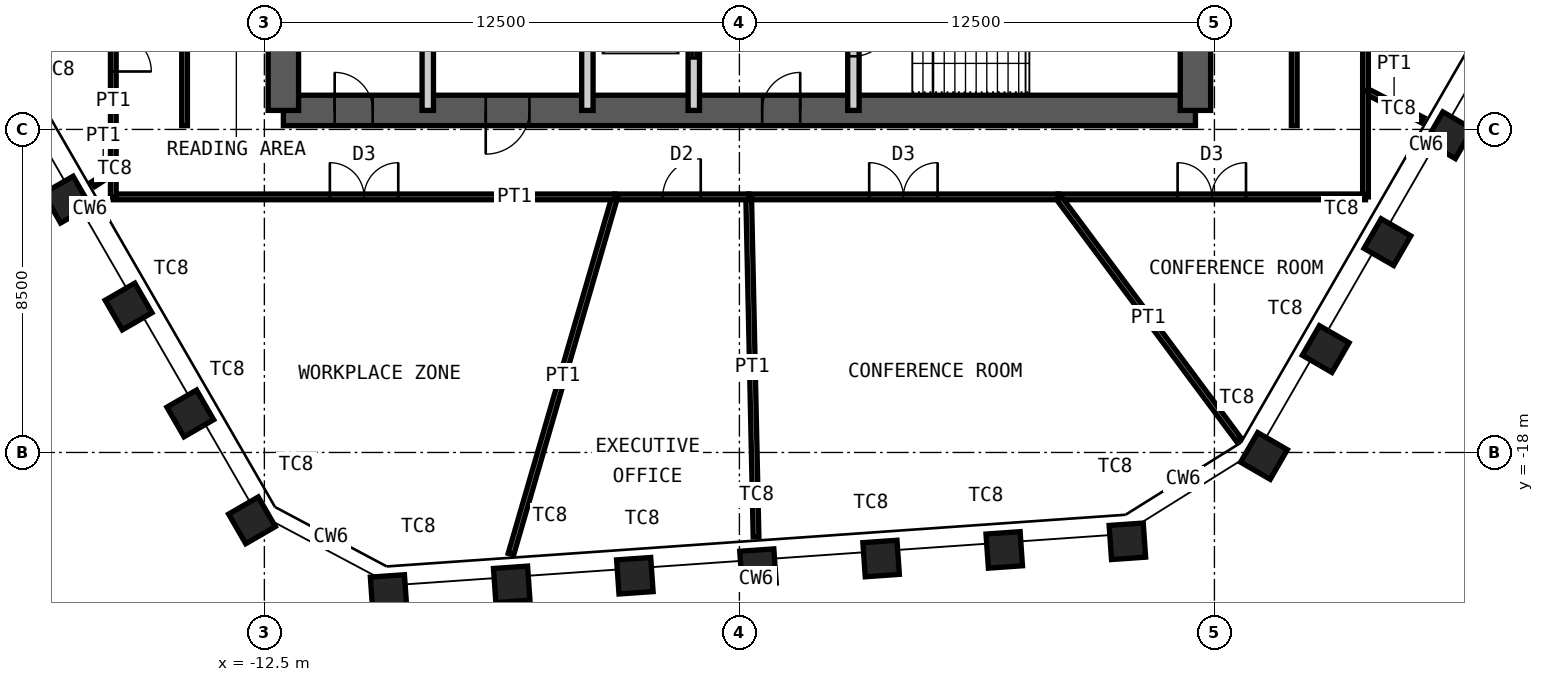
"""IFC4 building model, lengths in metres.
Left out: names, types, materials, properties, quantities, classifications, styles, units other than length and angle.
Written with IfcOpenShell. Run it as: python <this file> out.ifc"""

import sys

from ifc_helpers import new_model, si_unit, direction, frame, frame_2d, origin, origin_2d, place, context, subcontext, project, spatial, rectangle, hollow_rectangle, extrude, element, fill, save


model = new_model("IFC4")
c1 = context("Model", 3, precision=1e-05, world=origin(), true_north=direction((0.0, 1.0)))
c2 = subcontext(c1, "Body", "Model", "MODEL_VIEW")
j1 = project(units=[si_unit("LENGTHUNIT", "METRE"), si_unit("PLANEANGLEUNIT", "RADIAN")], contexts=[c1])
p1 = place(None, origin())
s1 = spatial("IfcSite", under=j1, at=p1, CompositionType="ELEMENT")
p2 = place(p1, origin())
s2 = spatial("IfcBuilding", under=s1, at=p2, CompositionType="ELEMENT")
p3 = place(p2, frame((0.0, 0.0, 325.0)))
s3 = spatial("IfcBuildingStorey", under=s2, at=p3, CompositionType="ELEMENT", Elevation=325.0)
for number, where, z_axis, x_axis in (
    (1, (18.676, -9.653, 0.0), (0.0, 0.0, 1.0), (0.5, 0.866, 0.0)),
    (2, (17.052, -12.466, 0.0), (0.0, 0.0, 1.0), (0.5, 0.866, 0.0)),
    (3, (15.427, -15.279, 0.0), (0.0, 0.0, 1.0), (0.5, 0.866, 0.0)),
    (4, (13.803, -18.092, 0.0), (0.0, 0.0, 1.0), (0.5, 0.866, 0.0)),
    (5, (10.209, -20.337, 0.0), (0.0, 0.0, 1.0), (0.998, 0.07, 0.0)),
    (6, (6.969, -20.564, 0.0), (0.0, 0.0, 1.0), (0.998, 0.07, 0.0)),
    (7, (3.729, -20.791, 0.0), (0.0, 0.0, 1.0), (0.998, 0.07, 0.0)),
    (8, (0.489, -21.017, 0.0), (0.0, 0.0, 1.0), (0.998, 0.07, 0.0)),
    (9, (-2.751, -21.244, 0.0), (0.0, 0.0, 1.0), (0.998, 0.07, 0.0)),
    (10, (-5.991, -21.47, 0.0), (0.0, 0.0, 1.0), (0.998, 0.07, 0.0)),
    (11, (-9.231, -21.697, 0.0), (0.0, 0.0, 1.0), (0.998, 0.07, 0.0)),
    (12, (-12.825, -19.786, 0.0), (0.0, 0.0, 1.0), (0.5, -0.866, 0.0)),
    (13, (-14.449, -16.973, 0.0), (0.0, 0.0, 1.0), (0.5, -0.866, 0.0)),
    (14, (-16.073, -14.16, 0.0), (0.0, 0.0, 1.0), (0.5, -0.866, 0.0)),
    (15, (-17.698, -11.347, 0.0), (0.0, 0.0, 1.0), (0.5, -0.866, 0.0)),
):
    element("IfcColumn", number, at=place(p3, frame(where, z_axis=z_axis, x_axis=x_axis)), inside=s3, PredefinedType="COLUMN", context=c2, shape_type="SweptSolid", body=[
        extrude(hollow_rectangle(XDim=0.9, YDim=0.9, WallThickness=0.05, at=origin_2d()), origin(), (0.0, 0.0, 1.0), 4.2),
    ])
p4 = place(p3, frame((-12.0, -9.0, 0.0), z_axis=(0.0, 0.0, 1.0), x_axis=(1.0, 0.0, 0.0)))
e16 = element("IfcWall", 16, at=p4, inside=s3, PredefinedType="SHEAR", context=c2, shape_type="SweptSolid", body=[
    extrude(rectangle(XDim=24.0, YDim=0.8, at=frame_2d((12.0, 0.0))), origin(), (0.0, 0.0, 1.0), 4.2),
])
p5 = place(p4, frame((1.35, 0.0, 0.0)))
e17 = element("IfcOpeningElement", 17, at=p5, cuts=e16, PredefinedType="OPENING", context=c2, shape_type="SweptSolid", body=[
    extrude(rectangle(XDim=1.0, YDim=2.1, at=frame_2d((0.5, 1.05))), frame((0.0, 0.41, 0.0), z_axis=(0.0, -1.0, 0.0), x_axis=(1.0, 0.0, 0.0)), (0.0, 0.0, 1.0), 0.82),
])
p6 = place(p4, frame((5.325, 0.0, 0.0)))
e18 = element("IfcOpeningElement", 18, at=p6, cuts=e16, PredefinedType="OPENING", context=c2, shape_type="SweptSolid", body=[
    extrude(rectangle(XDim=1.15, YDim=2.1, at=frame_2d((0.575, 1.05))), frame((0.0, 0.41, 0.0), z_axis=(0.0, -1.0, 0.0), x_axis=(1.0, 0.0, 0.0)), (0.0, 0.0, 1.0), 0.82),
])
p7 = place(p4, frame((12.6, 0.0, 0.0)))
e19 = element("IfcOpeningElement", 19, at=p7, cuts=e16, PredefinedType="OPENING", context=c2, shape_type="SweptSolid", body=[
    extrude(rectangle(XDim=1.0, YDim=2.1, at=frame_2d((0.5, 1.05))), frame((0.0, 0.41, 0.0), z_axis=(0.0, -1.0, 0.0), x_axis=(1.0, 0.0, 0.0)), (0.0, 0.0, 1.0), 0.82),
])
p8 = place(p3, frame((12.0, -9.0, 0.0), z_axis=(0.0, 0.0, 1.0), x_axis=(0.0, 1.0, 0.0)))
e20 = element("IfcWall", 20, at=p8, inside=s3, PredefinedType="SHEAR", context=c2, shape_type="SweptSolid", body=[
    extrude(rectangle(XDim=18.0, YDim=0.8, at=frame_2d((9.0, 0.0))), origin(), (0.0, 0.0, 1.0), 4.2),
])
p9 = place(p8, frame((8.1, 0.0, 0.0)))
e21 = element("IfcOpeningElement", 21, at=p9, cuts=e20, PredefinedType="OPENING", context=c2, shape_type="SweptSolid", body=[
    extrude(rectangle(XDim=1.8, YDim=2.1, at=frame_2d((0.9, 1.05))), frame((0.0, 0.41, 0.0), z_axis=(0.0, -1.0, 0.0), x_axis=(1.0, 0.0, 0.0)), (0.0, 0.0, 1.0), 0.82),
])
p10 = place(p3, frame((-12.0, -9.0, 0.0), z_axis=(0.0, 0.0, 1.0), x_axis=(0.0, 1.0, 0.0)))
e22 = element("IfcWall", 22, at=p10, inside=s3, PredefinedType="SHEAR", context=c2, shape_type="SweptSolid", body=[
    extrude(rectangle(XDim=18.0, YDim=0.8, at=frame_2d((9.0, 0.0))), origin(), (0.0, 0.0, 1.0), 4.2),
])
p11 = place(p10, frame((8.1, 0.0, 0.0)))
e23 = element("IfcOpeningElement", 23, at=p11, cuts=e22, PredefinedType="OPENING", context=c2, shape_type="SweptSolid", body=[
    extrude(rectangle(XDim=1.8, YDim=2.1, at=frame_2d((0.9, 1.05))), frame((0.0, 0.41, 0.0), z_axis=(0.0, -1.0, 0.0), x_axis=(1.0, 0.0, 0.0)), (0.0, 0.0, 1.0), 0.82),
])
for number, where, z_axis, x_axis in (
    (24, (-8.2, -9.0, 0.0), (0.0, 0.0, 1.0), (0.0, 1.0, 0.0)),
    (25, (-4.0, -9.0, 0.0), (0.0, 0.0, 1.0), (0.0, 1.0, 0.0)),
):
    element("IfcWall", number, at=place(p3, frame(where, z_axis=z_axis, x_axis=x_axis)), inside=s3, PredefinedType="PARTITIONING", context=c2, shape_type="SweptSolid", body=[
        extrude(rectangle(XDim=3.85, YDim=0.3, at=frame_2d((1.925, 0.0))), origin(), (0.0, 0.0, 1.0), 3.98),
    ])
p12 = place(p3, frame((-1.2, -9.0, 0.0), z_axis=(0.0, 0.0, 1.0), x_axis=(0.0, 1.0, 0.0)))
e26 = element("IfcWall", 26, at=p12, inside=s3, PredefinedType="PARTITIONING", context=c2, shape_type="SweptSolid", body=[
    extrude(rectangle(XDim=3.85, YDim=0.3, at=frame_2d((1.925, 0.0))), origin(), (0.0, 0.0, 1.0), 3.98),
])
p13 = place(p12, frame((1.375, 0.0, 0.0)))
e27 = element("IfcOpeningElement", 27, at=p13, cuts=e26, PredefinedType="OPENING", context=c2, shape_type="SweptSolid", body=[
    extrude(rectangle(XDim=1.1, YDim=2.4, at=frame_2d((0.55, 1.2))), frame((0.0, 0.16, 0.0), z_axis=(0.0, -1.0, 0.0), x_axis=(1.0, 0.0, 0.0)), (0.0, 0.0, 1.0), 0.32),
])
p14 = place(p3, frame((3.0, -9.0, 0.0), z_axis=(0.0, 0.0, 1.0), x_axis=(0.0, 1.0, 0.0)))
e28 = element("IfcWall", 28, at=p14, inside=s3, PredefinedType="PARTITIONING", context=c2, shape_type="SweptSolid", body=[
    extrude(rectangle(XDim=3.85, YDim=0.3, at=frame_2d((1.925, 0.0))), origin(), (0.0, 0.0, 1.0), 3.98),
])
p15 = place(p14, frame((1.425, 0.0, 0.0)))
e29 = element("IfcOpeningElement", 29, at=p15, cuts=e28, PredefinedType="OPENING", context=c2, shape_type="SweptSolid", body=[
    extrude(rectangle(XDim=1.0, YDim=2.1, at=frame_2d((0.5, 1.05))), frame((0.0, 0.16, 0.0), z_axis=(0.0, -1.0, 0.0), x_axis=(1.0, 0.0, 0.0)), (0.0, 0.0, 1.0), 0.32),
])
p16 = place(p3, frame((17.98, -9.257, 0.0), z_axis=(0.0, 0.0, 1.0), x_axis=(-0.889058145064, 0.457794292991, 0.0)))
e30 = element("IfcWall", 30, at=p16, inside=s3, PredefinedType="PARTITIONING", context=c2, shape_type="SweptSolid", body=[
    extrude(rectangle(XDim=1.693, YDim=0.15, at=frame_2d((0.847, 0.0))), origin(), (0.0, 0.0, 1.0), 3.33),
])
p17 = place(p3, frame((16.475, -8.482, 0.0), z_axis=(0.0, 0.0, 1.0), x_axis=(0.0, -1.0, 0.0)))
e31 = element("IfcWall", 31, at=p17, inside=s3, PredefinedType="PARTITIONING", context=c2, shape_type="SweptSolid", body=[
    extrude(rectangle(XDim=2.793, YDim=0.15, at=frame_2d((1.396, 0.0))), origin(), (0.0, 0.0, 1.0), 4.03),
])
p18 = place(p3, frame((16.475, -11.275, 0.0), z_axis=(0.0, 0.0, 1.0), x_axis=(-1.0, 0.0, 0.0)))
e32 = element("IfcWall", 32, at=p18, inside=s3, PredefinedType="PARTITIONING", context=c2, shape_type="SweptSolid", body=[
    extrude(rectangle(XDim=8.088, YDim=0.15, at=frame_2d((4.044, 0.0))), origin(), (0.0, 0.0, 1.0), 4.03),
])
p19 = place(p18, frame((3.144, 0.0, 0.0)))
e33 = element("IfcOpeningElement", 33, at=p19, cuts=e32, PredefinedType="OPENING", context=c2, shape_type="SweptSolid", body=[
    extrude(rectangle(XDim=1.8, YDim=2.4, at=frame_2d((0.9, 1.2))), frame((0.0, 0.085, 0.0), z_axis=(0.0, -1.0, 0.0), x_axis=(1.0, 0.0, 0.0)), (0.0, 0.0, 1.0), 0.17),
])
p20 = place(p3, frame((13.138, -17.661, 0.0), z_axis=(0.0, 0.0, 1.0), x_axis=(-0.596829877953, 0.802367806422, 0.0)))
e34 = element("IfcWall", 34, at=p20, inside=s3, PredefinedType="PARTITIONING", context=c2, shape_type="SweptSolid", body=[
    extrude(rectangle(XDim=7.959, YDim=0.15, at=frame_2d((3.98, 0.0))), origin(), (0.0, 0.0, 1.0), 2.93),
])
p21 = place(p3, frame((8.387, -11.275, 0.0), z_axis=(0.0, 0.0, 1.0), x_axis=(-1.0, 0.0, 0.0)))
e35 = element("IfcWall", 35, at=p21, inside=s3, PredefinedType="PARTITIONING", context=c2, shape_type="SweptSolid", body=[
    extrude(rectangle(XDim=8.143, YDim=0.15, at=frame_2d((4.071, 0.0))), origin(), (0.0, 0.0, 1.0), 4.03),
])
p22 = place(p21, frame((3.171, 0.0, 0.0)))
e36 = element("IfcOpeningElement", 36, at=p22, cuts=e35, PredefinedType="OPENING", context=c2, shape_type="SweptSolid", body=[
    extrude(rectangle(XDim=1.8, YDim=2.4, at=frame_2d((0.9, 1.2))), frame((0.0, 0.085, 0.0), z_axis=(0.0, -1.0, 0.0), x_axis=(1.0, 0.0, 0.0)), (0.0, 0.0, 1.0), 0.17),
])
p23 = place(p3, frame((0.438, -20.219, 0.0), z_axis=(0.0, 0.0, 1.0), x_axis=(-0.021641488123, 0.99976579557, 0.0)))
e37 = element("IfcWall", 37, at=p23, inside=s3, PredefinedType="PARTITIONING", context=c2, shape_type="SweptSolid", body=[
    extrude(rectangle(XDim=8.946, YDim=0.15, at=frame_2d((4.473, 0.0))), origin(), (0.0, 0.0, 1.0), 3.33),
])
p24 = place(p3, frame((0.244, -11.275, 0.0), z_axis=(0.0, 0.0, 1.0), x_axis=(-1.0, 0.0, 0.0)))
e38 = element("IfcWall", 38, at=p24, inside=s3, PredefinedType="PARTITIONING", context=c2, shape_type="SweptSolid", body=[
    extrude(rectangle(XDim=3.523, YDim=0.15, at=frame_2d((1.761, 0.0))), origin(), (0.0, 0.0, 1.0), 4.03),
])
p25 = place(p24, frame((1.261, 0.0, 0.0)))
e39 = element("IfcOpeningElement", 39, at=p25, cuts=e38, PredefinedType="OPENING", context=c2, shape_type="SweptSolid", body=[
    extrude(rectangle(XDim=1.0, YDim=2.4, at=frame_2d((0.5, 1.2))), frame((0.0, 0.085, 0.0), z_axis=(0.0, -1.0, 0.0), x_axis=(1.0, 0.0, 0.0)), (0.0, 0.0, 1.0), 0.17),
])
p26 = place(p3, frame((-6.012, -20.676, 0.0), z_axis=(0.0, 0.0, 1.0), x_axis=(0.279197441451, 0.960233715658, 0.0)))
e40 = element("IfcWall", 40, at=p26, inside=s3, PredefinedType="PARTITIONING", context=c2, shape_type="SweptSolid", body=[
    extrude(rectangle(XDim=9.79, YDim=0.15, at=frame_2d((4.895, 0.0))), origin(), (0.0, 0.0, 1.0), 3.33),
])
p27 = place(p3, frame((-3.279, -11.275, 0.0), z_axis=(0.0, 0.0, 1.0), x_axis=(-1.0, 0.0, 0.0)))
e41 = element("IfcWall", 41, at=p27, inside=s3, PredefinedType="PARTITIONING", context=c2, shape_type="SweptSolid", body=[
    extrude(rectangle(XDim=13.197, YDim=0.15, at=frame_2d((6.598, 0.0))), origin(), (0.0, 0.0, 1.0), 4.03),
])
p28 = place(p27, frame((5.698, 0.0, 0.0)))
e42 = element("IfcOpeningElement", 42, at=p28, cuts=e41, PredefinedType="OPENING", context=c2, shape_type="SweptSolid", body=[
    extrude(rectangle(XDim=1.8, YDim=2.4, at=frame_2d((0.9, 1.2))), frame((0.0, 0.085, 0.0), z_axis=(0.0, -1.0, 0.0), x_axis=(1.0, 0.0, 0.0)), (0.0, 0.0, 1.0), 0.17),
])
p29 = place(p3, frame((-16.475, -11.275, 0.0), z_axis=(0.0, 0.0, 1.0), x_axis=(0.0, 1.0, 0.0)))
e43 = element("IfcWall", 43, at=p29, inside=s3, PredefinedType="PARTITIONING", context=c2, shape_type="SweptSolid", body=[
    extrude(rectangle(XDim=0.674, YDim=0.15, at=frame_2d((0.337, 0.0))), origin(), (0.0, 0.0, 1.0), 4.03),
])
p30 = place(p3, frame((-17.007, -10.943, 0.0), z_axis=(0.0, 0.0, 1.0), x_axis=(0.840789611822, 0.541362012568, 0.0)))
e44 = element("IfcWall", 44, at=p30, inside=s3, PredefinedType="PARTITIONING", context=c2, shape_type="SweptSolid", body=[
    extrude(rectangle(XDim=0.633, YDim=0.15, at=frame_2d((0.316, 0.0))), origin(), (0.0, 0.0, 1.0), 3.33),
])
p31 = place(p3, frame((-16.475, -10.601, 0.0), z_axis=(0.0, 0.0, 1.0), x_axis=(0.0, 1.0, 0.0)))
e45 = element("IfcWall", 45, at=p31, inside=s3, PredefinedType="PARTITIONING", context=c2, shape_type="SweptSolid", body=[
    extrude(rectangle(XDim=6.25, YDim=0.15, at=frame_2d((3.125, 0.0))), origin(), (0.0, 0.0, 1.0), 4.03),
])
p32 = place(p31, frame((2.625, 0.0, 0.0)))
e46 = element("IfcOpeningElement", 46, at=p32, cuts=e45, PredefinedType="OPENING", context=c2, shape_type="SweptSolid", body=[
    extrude(rectangle(XDim=1.0, YDim=2.4, at=frame_2d((0.5, 1.2))), frame((0.0, 0.085, 0.0), z_axis=(0.0, -1.0, 0.0), x_axis=(1.0, 0.0, 0.0)), (0.0, 0.0, 1.0), 0.17),
])
p33 = place(p3, frame((16.475, 1.777, 0.0), z_axis=(0.0, 0.0, 1.0), x_axis=(0.0, -1.0, 0.0)))
e47 = element("IfcWall", 47, at=p33, inside=s3, PredefinedType="PARTITIONING", context=c2, shape_type="SweptSolid", body=[
    extrude(rectangle(XDim=10.259, YDim=0.15, at=frame_2d((5.13, 0.0))), origin(), (0.0, 0.0, 1.0), 4.03),
])
p34 = place(p33, frame((4.23, 0.0, 0.0)))
e48 = element("IfcOpeningElement", 48, at=p34, cuts=e47, PredefinedType="OPENING", context=c2, shape_type="SweptSolid", body=[
    extrude(rectangle(XDim=1.8, YDim=2.4, at=frame_2d((0.9, 1.2))), frame((0.0, 0.085, 0.0), z_axis=(0.0, -1.0, 0.0), x_axis=(1.0, 0.0, 0.0)), (0.0, 0.0, 1.0), 0.17),
])
for number, where, z_axis, x_axis in (
    (49, (14.6, -9.4, 0.0), (0.0, 0.0, 1.0), (0.0, 1.0, 0.0)),
    (50, (-14.6, -9.4, 0.0), (0.0, 0.0, 1.0), (0.0, 1.0, 0.0)),
):
    element("IfcWall", number, at=place(p3, frame(where, z_axis=z_axis, x_axis=x_axis)), inside=s3, PredefinedType="PARTITIONING", context=c2, shape_type="SweptSolid", body=[
        extrude(rectangle(XDim=6.9, YDim=0.15, at=frame_2d((3.45, 0.0))), origin(), (0.0, 0.0, 1.0), 4.03),
    ])
p35 = place(p5, origin())
e51 = element("IfcDoor", 51, at=p35, inside=s3, OperationType="SINGLE_SWING_RIGHT", PredefinedType="DOOR", context=c2, shape_type="SweptSolid", body=[
    extrude(rectangle(XDim=1.0, YDim=2.1, at=frame_2d((0.5, 1.05))), frame((0.0, 0.025, 0.0), z_axis=(0.0, -1.0, 0.0), x_axis=(1.0, 0.0, 0.0)), (0.0, 0.0, 1.0), 0.05),
])
fill(e17, e51)
p36 = place(p6, origin())
e52 = element("IfcDoor", 52, at=p36, inside=s3, OperationType="SINGLE_SWING_LEFT", PredefinedType="DOOR", context=c2, shape_type="SweptSolid", body=[
    extrude(rectangle(XDim=1.15, YDim=2.1, at=frame_2d((0.575, 1.05))), frame((0.0, 0.025, 0.0), z_axis=(0.0, -1.0, 0.0), x_axis=(1.0, 0.0, 0.0)), (0.0, 0.0, 1.0), 0.05),
])
fill(e18, e52)
p37 = place(p7, origin())
e53 = element("IfcDoor", 53, at=p37, inside=s3, OperationType="SINGLE_SWING_LEFT", PredefinedType="DOOR", context=c2, shape_type="SweptSolid", body=[
    extrude(rectangle(XDim=1.0, YDim=2.1, at=frame_2d((0.5, 1.05))), frame((0.0, 0.025, 0.0), z_axis=(0.0, -1.0, 0.0), x_axis=(1.0, 0.0, 0.0)), (0.0, 0.0, 1.0), 0.05),
])
fill(e19, e53)
p38 = place(p15, origin())
e54 = element("IfcDoor", 54, at=p38, inside=s3, OperationType="SINGLE_SWING_RIGHT", PredefinedType="DOOR", context=c2, shape_type="SweptSolid", body=[
    extrude(rectangle(XDim=1.0, YDim=2.1, at=frame_2d((0.5, 1.05))), frame((0.0, 0.025, 0.0), z_axis=(0.0, -1.0, 0.0), x_axis=(1.0, 0.0, 0.0)), (0.0, 0.0, 1.0), 0.05),
])
fill(e29, e54)
p39 = place(p13, origin())
e55 = element("IfcDoor", 55, at=p39, inside=s3, OperationType="DOUBLE_DOOR_SLIDING", PredefinedType="DOOR", context=c2, shape_type="SweptSolid", body=[
    extrude(rectangle(XDim=1.1, YDim=2.4, at=frame_2d((0.55, 1.2))), frame((0.0, 0.025, 0.0), z_axis=(0.0, -1.0, 0.0), x_axis=(1.0, 0.0, 0.0)), (0.0, 0.0, 1.0), 0.05),
])
fill(e27, e55)
p40 = place(p19, origin())
e56 = element("IfcDoor", 56, at=p40, inside=s3, OperationType="DOUBLE_DOOR_DOUBLE_SWING", PredefinedType="DOOR", context=c2, shape_type="SweptSolid", body=[
    extrude(rectangle(XDim=1.8, YDim=2.4, at=frame_2d((0.9, 1.2))), frame((0.0, 0.025, 0.0), z_axis=(0.0, -1.0, 0.0), x_axis=(1.0, 0.0, 0.0)), (0.0, 0.0, 1.0), 0.05),
])
fill(e33, e56)
p41 = place(p22, origin())
e57 = element("IfcDoor", 57, at=p41, inside=s3, OperationType="DOUBLE_DOOR_DOUBLE_SWING", PredefinedType="DOOR", context=c2, shape_type="SweptSolid", body=[
    extrude(rectangle(XDim=1.8, YDim=2.4, at=frame_2d((0.9, 1.2))), frame((0.0, 0.025, 0.0), z_axis=(0.0, -1.0, 0.0), x_axis=(1.0, 0.0, 0.0)), (0.0, 0.0, 1.0), 0.05),
])
fill(e36, e57)
p42 = place(p25, origin())
e58 = element("IfcDoor", 58, at=p42, inside=s3, OperationType="SINGLE_SWING_LEFT", PredefinedType="DOOR", context=c2, shape_type="SweptSolid", body=[
    extrude(rectangle(XDim=1.0, YDim=2.4, at=frame_2d((0.5, 1.2))), frame((0.0, 0.025, 0.0), z_axis=(0.0, -1.0, 0.0), x_axis=(1.0, 0.0, 0.0)), (0.0, 0.0, 1.0), 0.05),
])
fill(e39, e58)
p43 = place(p28, origin())
e59 = element("IfcDoor", 59, at=p43, inside=s3, OperationType="DOUBLE_DOOR_DOUBLE_SWING", PredefinedType="DOOR", context=c2, shape_type="SweptSolid", body=[
    extrude(rectangle(XDim=1.8, YDim=2.4, at=frame_2d((0.9, 1.2))), frame((0.0, 0.025, 0.0), z_axis=(0.0, -1.0, 0.0), x_axis=(1.0, 0.0, 0.0)), (0.0, 0.0, 1.0), 0.05),
])
fill(e42, e59)
p44 = place(p32, origin())
e60 = element("IfcDoor", 60, at=p44, inside=s3, OperationType="SINGLE_SWING_LEFT", PredefinedType="DOOR", context=c2, shape_type="SweptSolid", body=[
    extrude(rectangle(XDim=1.0, YDim=2.4, at=frame_2d((0.5, 1.2))), frame((0.0, 0.025, 0.0), z_axis=(0.0, -1.0, 0.0), x_axis=(1.0, 0.0, 0.0)), (0.0, 0.0, 1.0), 0.05),
])
fill(e46, e60)
save(model, sys.argv[1])
